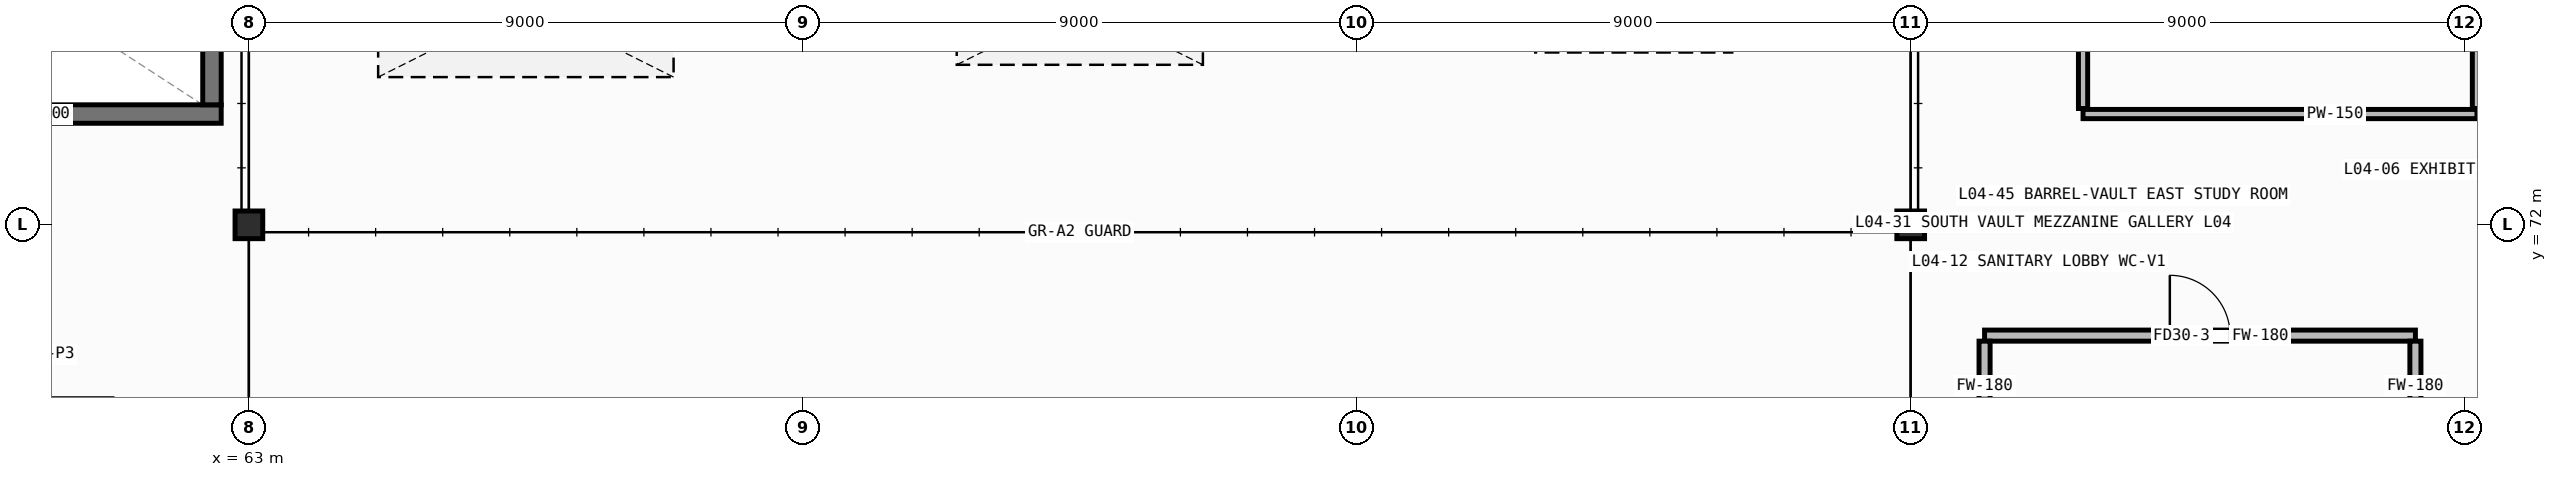
"""IFC4 building model, lengths in metres.
Left out: names, types, materials, properties, quantities, classifications, styles, units other than length and angle.
Written with IfcOpenShell. Run it as: python <this file> out.ifc"""

import sys

from ifc_helpers import new_model, si_unit, direction, frame, frame_2d, origin, origin_2d, place, context, subcontext, project, spatial, rectangle, hollow_rectangle, extrude, element, fill, save


model = new_model("IFC4")
c1 = context("Model", 3, precision=1e-05, world=origin(), true_north=direction((0.0, 1.0)))
c2 = subcontext(c1, "Body", "Model", "MODEL_VIEW")
j1 = project(units=[si_unit("LENGTHUNIT", "METRE"), si_unit("PLANEANGLEUNIT", "RADIAN")], contexts=[c1])
p1 = place(None, origin())
s1 = spatial("IfcSite", under=j1, at=p1, CompositionType="ELEMENT")
p2 = place(p1, origin())
s2 = spatial("IfcBuilding", under=s1, at=p2, CompositionType="ELEMENT")
p3 = place(p2, frame((0.0, 0.0, 12.8)))
s3 = spatial("IfcBuildingStorey", under=s2, at=p3, CompositionType="ELEMENT", Elevation=12.8)
for number, where, z_axis, x_axis in (
    (1, (63.0, 72.0, 0.0), (0.0, 0.0, 1.0), (1.0, 0.0, 0.0)),
    (2, (90.0, 72.0, 0.0), (0.0, 0.0, 1.0), (1.0, 0.0, 0.0)),
):
    element("IfcColumn", number, at=place(p3, frame(where, z_axis=z_axis, x_axis=x_axis)), inside=s3, PredefinedType="COLUMN", context=c2, shape_type="SweptSolid", body=[
        extrude(hollow_rectangle(XDim=0.45, YDim=0.45, WallThickness=0.019, at=origin_2d()), origin(), (0.0, 0.0, 1.0), 3.78),
    ])
p4 = place(p3, frame((54.45, 73.8, 0.0), z_axis=(0.0, 0.0, 1.0), x_axis=(1.0, 0.0, 0.0)))
e3 = element("IfcWall", 3, at=p4, inside=s3, PredefinedType="SHEAR", context=c2, shape_type="SweptSolid", body=[
    extrude(rectangle(XDim=8.1, YDim=0.3, at=frame_2d((4.05, 0.0))), origin(), (0.0, 0.0, 1.0), 3.78),
])
p5 = place(p4, frame((0.5, 0.0, 0.0)))
e4 = element("IfcOpeningElement", 4, at=p5, cuts=e3, PredefinedType="OPENING", context=c2, shape_type="SweptSolid", body=[
    extrude(rectangle(XDim=1.2, YDim=2.1, at=frame_2d((0.6, 1.05))), frame((0.0, 0.162, 0.0), z_axis=(0.0, -1.0, 0.0), x_axis=(1.0, 0.0, 0.0)), (0.0, 0.0, 1.0), 0.324),
])
p6 = place(p3, frame((62.4, 73.95, 0.0), z_axis=(0.0, 0.0, 1.0), x_axis=(0.0, 1.0, 0.0)))
e5 = element("IfcWall", 5, at=p6, inside=s3, PredefinedType="SHEAR", context=c2, shape_type="SweptSolid", body=[
    extrude(rectangle(XDim=3.8, YDim=0.3, at=frame_2d((1.9, 0.0))), origin(), (0.0, 0.0, 1.0), 3.78),
])
p7 = place(p3, frame((91.2, 70.2, 0.0), z_axis=(0.0, 0.0, 1.0), x_axis=(1.0, 0.0, 0.0)))
e6 = element("IfcWall", 6, at=p7, inside=s3, PredefinedType="PARTITIONING", context=c2, shape_type="SweptSolid", body=[
    extrude(rectangle(XDim=7.0, YDim=0.18, at=frame_2d((3.5, 0.0))), origin(), (0.0, 0.0, 1.0), 3.78),
])
p8 = place(p7, frame((3.01, 0.0, 0.0)))
e7 = element("IfcOpeningElement", 7, at=p8, cuts=e6, PredefinedType="OPENING", context=c2, shape_type="SweptSolid", body=[
    extrude(rectangle(XDim=0.98, YDim=2.02, at=frame_2d((0.49, 1.01))), frame((0.0, 0.102, 0.0), z_axis=(0.0, -1.0, 0.0), x_axis=(1.0, 0.0, 0.0)), (0.0, 0.0, 1.0), 0.204),
])
for number, where, z_axis, x_axis in (
    (8, (91.2, 68.09, 0.0), (0.0, 0.0, 1.0), (0.0, 1.0, 0.0)),
    (9, (98.2, 68.09, 0.0), (0.0, 0.0, 1.0), (0.0, 1.0, 0.0)),
):
    element("IfcWall", number, at=place(p3, frame(where, z_axis=z_axis, x_axis=x_axis)), inside=s3, PredefinedType="PARTITIONING", context=c2, shape_type="SweptSolid", body=[
        extrude(rectangle(XDim=2.02, YDim=0.18, at=frame_2d((1.01, 0.0))), origin(), (0.0, 0.0, 1.0), 3.78),
    ])
p9 = place(p3, frame((92.8, 73.8, 0.0), z_axis=(0.0, 0.0, 1.0), x_axis=(1.0, 0.0, 0.0)))
e10 = element("IfcWall", 10, at=p9, inside=s3, PredefinedType="PARTITIONING", context=c2, shape_type="SweptSolid", body=[
    extrude(rectangle(XDim=6.4, YDim=0.15, at=frame_2d((3.2, 0.0))), origin(), (0.0, 0.0, 1.0), 3.78),
])
p10 = place(p3, frame((92.8, 73.89, 0.0), z_axis=(0.0, 0.0, 1.0), x_axis=(0.0, 1.0, 0.0)))
e11 = element("IfcWall", 11, at=p10, inside=s3, PredefinedType="PARTITIONING", context=c2, shape_type="SweptSolid", body=[
    extrude(rectangle(XDim=12.42, YDim=0.15, at=frame_2d((6.21, 0.0))), origin(), (0.0, 0.0, 1.0), 3.78),
])
p11 = place(p10, frame((6.11, 0.0, 0.0)))
e12 = element("IfcOpeningElement", 12, at=p11, cuts=e11, PredefinedType="OPENING", context=c2, shape_type="SweptSolid", body=[
    extrude(rectangle(XDim=0.96, YDim=2.1, at=frame_2d((0.48, 1.05))), frame((0.0, 0.087, 0.0), z_axis=(0.0, -1.0, 0.0), x_axis=(1.0, 0.0, 0.0)), (0.0, 0.0, 1.0), 0.174),
])
p12 = place(p3, frame((99.2, 73.89, 0.0), z_axis=(0.0, 0.0, 1.0), x_axis=(0.0, 1.0, 0.0)))
e13 = element("IfcWall", 13, at=p12, inside=s3, PredefinedType="PARTITIONING", context=c2, shape_type="SweptSolid", body=[
    extrude(rectangle(XDim=12.0, YDim=0.15, at=frame_2d((6.0, 0.0))), origin(), (0.0, 0.0, 1.0), 3.06),
])
p13 = place(p3, frame((0.0, 0.0, 3.78)))
p14 = place(p13, frame((67.5, 75.6, 0.16)))
e14 = element("IfcWindow", 14, at=p14, inside=s3, PartitioningType="SINGLE_PANEL", PredefinedType="SKYLIGHT", context=c2, shape_type="SweptSolid", body=[
    extrude(rectangle(XDim=4.8, YDim=2.4, at=origin_2d()), origin(), (0.0, 0.0, 1.0), 0.06),
])
p15 = place(p13, frame((76.5, 75.6, 0.16)))
e15 = element("IfcWindow", 15, at=p15, inside=s3, PartitioningType="SINGLE_PANEL", PredefinedType="SKYLIGHT", context=c2, shape_type="SweptSolid", body=[
    extrude(rectangle(XDim=4.0, YDim=2.0, at=origin_2d()), origin(), (0.0, 0.0, 1.0), 0.06),
])
p16 = place(p8, origin())
e16 = element("IfcDoor", 16, at=p16, inside=s3, OperationType="SINGLE_SWING_LEFT", PredefinedType="DOOR", context=c2, shape_type="SweptSolid", body=[
    extrude(rectangle(XDim=0.98, YDim=2.02, at=frame_2d((0.49, 1.01))), frame((0.0, 0.025, 0.0), z_axis=(0.0, -1.0, 0.0), x_axis=(1.0, 0.0, 0.0)), (0.0, 0.0, 1.0), 0.05),
])
fill(e7, e16)
save(model, sys.argv[1])
